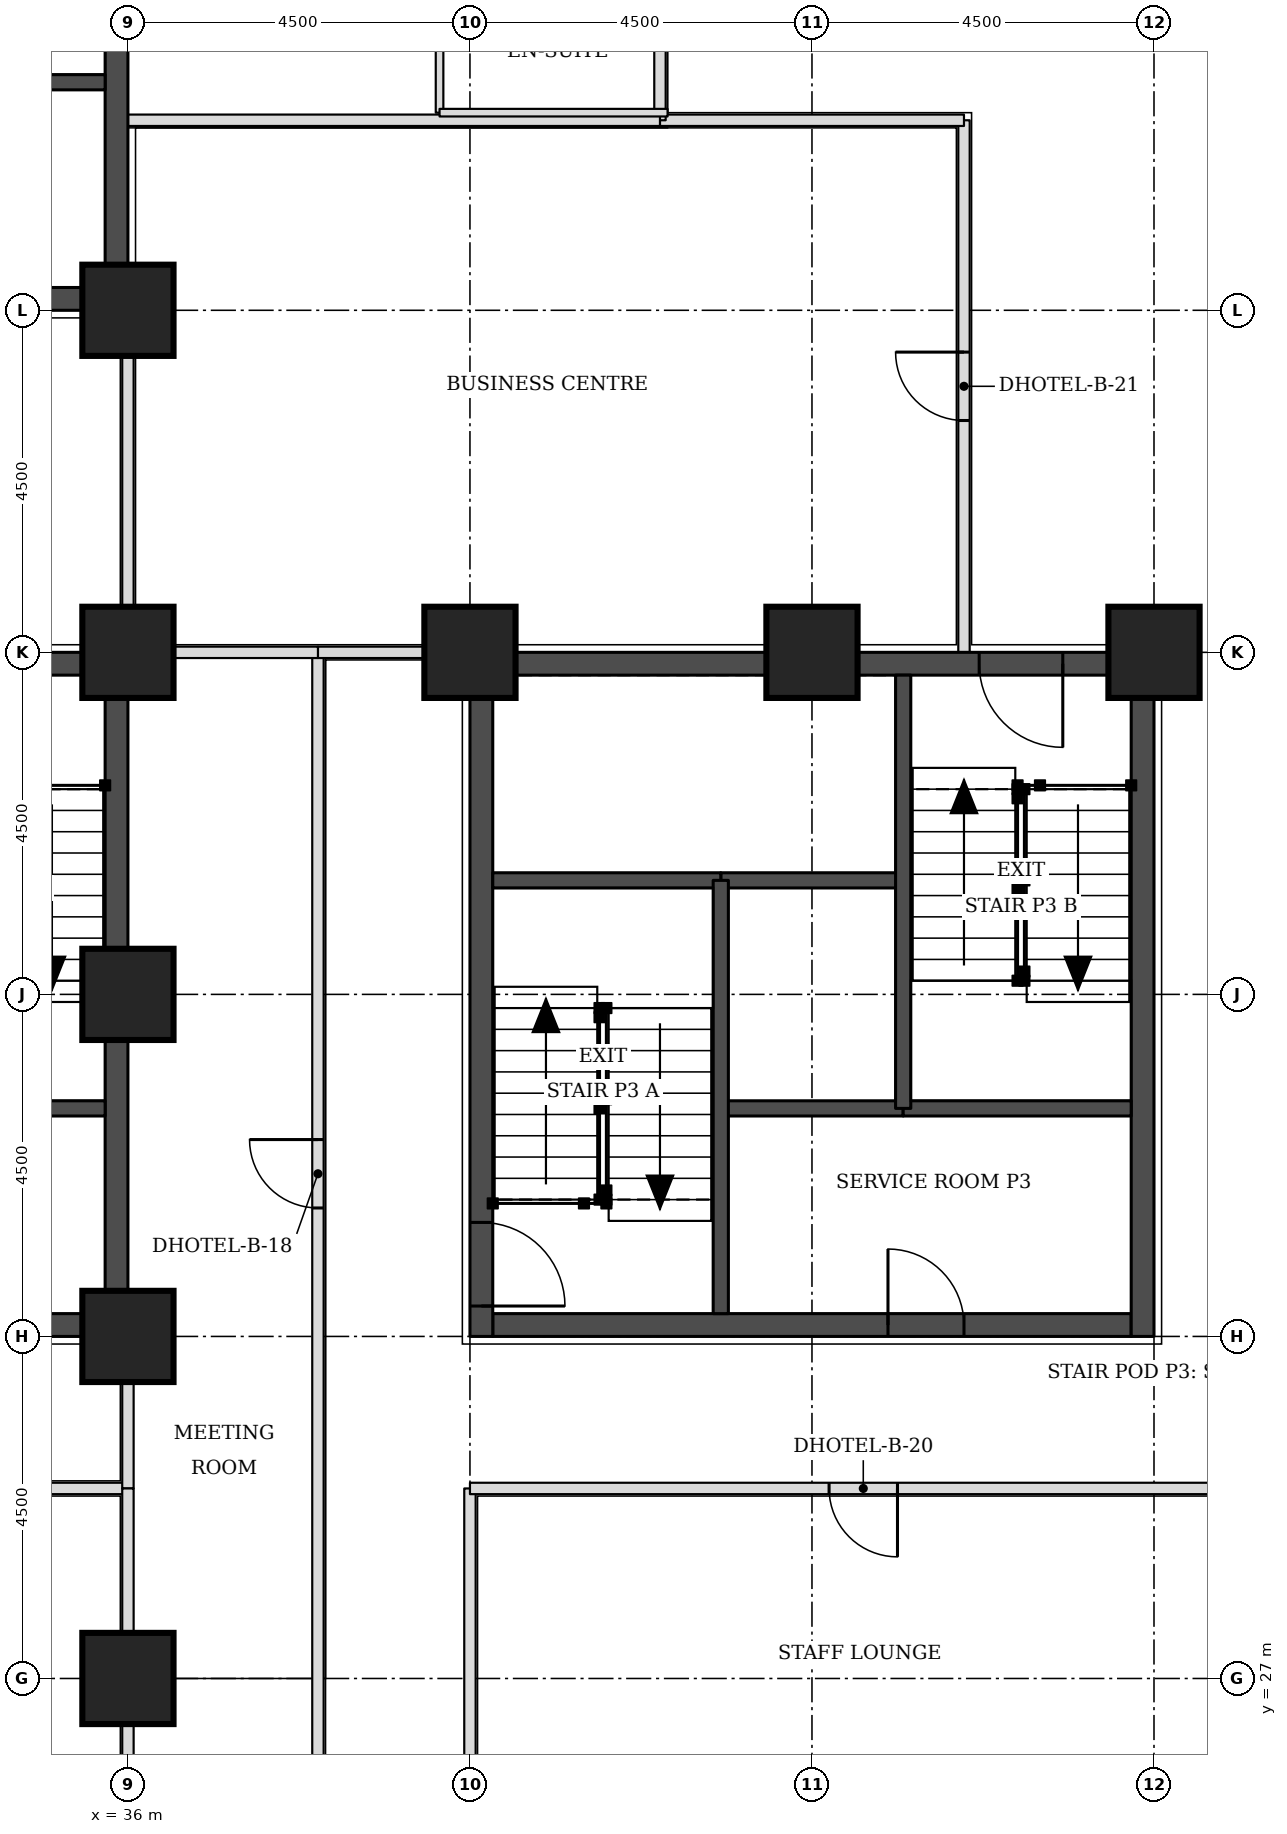
"""IFC4 building model, lengths in metres.
Left out: names, types, materials, properties, quantities, classifications, styles, units other than length and angle.
Written with IfcOpenShell. Run it as: python <this file> out.ifc"""

import sys

from ifc_helpers import new_model, si_unit, direction, frame, frame_2d, origin, origin_2d, place, context, subcontext, project, spatial, rectangle, extrude, element, fill, save


model = new_model("IFC4")
c1 = context("Model", 3, precision=1e-05, world=origin(), true_north=direction((0.0, 1.0)))
c2 = subcontext(c1, "Body", "Model", "MODEL_VIEW")
j1 = project(units=[si_unit("LENGTHUNIT", "METRE"), si_unit("PLANEANGLEUNIT", "RADIAN")], contexts=[c1])
p1 = place(None, origin())
s1 = spatial("IfcSite", under=j1, at=p1, CompositionType="ELEMENT")
p2 = place(p1, origin())
s2 = spatial("IfcBuilding", under=s1, at=p2, CompositionType="ELEMENT")
p3 = place(p2, frame((0.0, 0.0, 29.7)))
s3 = spatial("IfcBuildingStorey", under=s2, at=p3, CompositionType="ELEMENT", Elevation=29.7)
for number, where, z_axis, x_axis in (
    (1, (36.0, 27.0, 0.0), (0.0, 0.0, 1.0), (1.0, 0.0, 0.0)),
    (2, (36.0, 31.5, 0.0), (0.0, 0.0, 1.0), (1.0, 0.0, 0.0)),
    (3, (36.0, 36.0, 0.0), (0.0, 0.0, 1.0), (1.0, 0.0, 0.0)),
    (4, (36.0, 40.5, 0.0), (0.0, 0.0, 1.0), (1.0, 0.0, 0.0)),
    (5, (40.5, 40.5, 0.0), (0.0, 0.0, 1.0), (1.0, 0.0, 0.0)),
    (6, (45.0, 40.5, 0.0), (0.0, 0.0, 1.0), (1.0, 0.0, 0.0)),
    (7, (49.5, 40.5, 0.0), (0.0, 0.0, 1.0), (1.0, 0.0, 0.0)),
    (8, (36.0, 45.0, 0.0), (0.0, 0.0, 1.0), (1.0, 0.0, 0.0)),
):
    element("IfcColumn", number, at=place(p3, frame(where, z_axis=z_axis, x_axis=x_axis)), inside=s3, PredefinedType="COLUMN", context=c2, shape_type="SweptSolid", body=[
        extrude(rectangle(XDim=1.2, YDim=1.2, at=origin_2d()), origin(), (0.0, 0.0, 1.0), 3.3),
    ])
p4 = place(p3, frame((27.3, 45.15, 0.0), z_axis=(0.0, 0.0, 1.0), x_axis=(1.0, 0.0, 0.0)))
e9 = element("IfcWall", 9, at=p4, inside=s3, PredefinedType="SHEAR", context=c2, shape_type="SweptSolid", body=[
    extrude(rectangle(XDim=8.4, YDim=0.3, at=frame_2d((4.2, 0.0))), origin(), (0.0, 0.0, 1.0), 3.3),
])
p5 = place(p4, frame((5.2, 0.0, 0.0)))
e10 = element("IfcOpeningElement", 10, at=p5, cuts=e9, PredefinedType="OPENING", context=c2, shape_type="SweptSolid", body=[
    extrude(rectangle(XDim=1.0, YDim=2.1, at=frame_2d((0.5, 1.05))), frame((0.0, 0.16, 0.0), z_axis=(0.0, -1.0, 0.0), x_axis=(1.0, 0.0, 0.0)), (0.0, 0.0, 1.0), 0.32),
])
p6 = place(p3, frame((35.85, 45.0, 0.0), z_axis=(0.0, 0.0, 1.0), x_axis=(0.0, 1.0, 0.0)))
e11 = element("IfcWall", 11, at=p6, inside=s3, PredefinedType="SHEAR", context=c2, shape_type="SweptSolid", body=[
    extrude(rectangle(XDim=9.0, YDim=0.3, at=frame_2d((4.5, 0.0))), origin(), (0.0, 0.0, 1.0), 3.3),
])
p7 = place(p3, frame((40.8, 31.65, 0.0), z_axis=(0.0, 0.0, 1.0), x_axis=(1.0, 0.0, 0.0)))
e12 = element("IfcWall", 12, at=p7, inside=s3, PredefinedType="SHEAR", context=c2, shape_type="SweptSolid", body=[
    extrude(rectangle(XDim=8.4, YDim=0.3, at=frame_2d((4.2, 0.0))), origin(), (0.0, 0.0, 1.0), 3.3),
])
p8 = place(p7, frame((5.2, 0.0, 0.0)))
e13 = element("IfcOpeningElement", 13, at=p8, cuts=e12, PredefinedType="OPENING", context=c2, shape_type="SweptSolid", body=[
    extrude(rectangle(XDim=1.0, YDim=2.1, at=frame_2d((0.5, 1.05))), frame((0.0, 0.16, 0.0), z_axis=(0.0, -1.0, 0.0), x_axis=(1.0, 0.0, 0.0)), (0.0, 0.0, 1.0), 0.32),
])
p9 = place(p3, frame((40.8, 40.35, 0.0), z_axis=(0.0, 0.0, 1.0), x_axis=(1.0, 0.0, 0.0)))
e14 = element("IfcWall", 14, at=p9, inside=s3, PredefinedType="SHEAR", context=c2, shape_type="SweptSolid", body=[
    extrude(rectangle(XDim=8.4, YDim=0.3, at=frame_2d((4.2, 0.0))), origin(), (0.0, 0.0, 1.0), 3.3),
])
p10 = place(p9, frame((6.4, 0.0, 0.0)))
e15 = element("IfcOpeningElement", 15, at=p10, cuts=e14, PredefinedType="OPENING", context=c2, shape_type="SweptSolid", body=[
    extrude(rectangle(XDim=1.1, YDim=2.1, at=frame_2d((0.55, 1.05))), frame((0.0, 0.16, 0.0), z_axis=(0.0, -1.0, 0.0), x_axis=(1.0, 0.0, 0.0)), (0.0, 0.0, 1.0), 0.32),
])
p11 = place(p3, frame((40.65, 31.5, 0.0), z_axis=(0.0, 0.0, 1.0), x_axis=(0.0, 1.0, 0.0)))
e16 = element("IfcWall", 16, at=p11, inside=s3, PredefinedType="SHEAR", context=c2, shape_type="SweptSolid", body=[
    extrude(rectangle(XDim=9.0, YDim=0.3, at=frame_2d((4.5, 0.0))), origin(), (0.0, 0.0, 1.0), 3.3),
])
p12 = place(p11, frame((0.4, 0.0, 0.0)))
e17 = element("IfcOpeningElement", 17, at=p12, cuts=e16, PredefinedType="OPENING", context=c2, shape_type="SweptSolid", body=[
    extrude(rectangle(XDim=1.1, YDim=2.1, at=frame_2d((0.55, 1.05))), frame((0.0, 0.16, 0.0), z_axis=(0.0, -1.0, 0.0), x_axis=(1.0, 0.0, 0.0)), (0.0, 0.0, 1.0), 0.32),
])
p13 = place(p3, frame((49.35, 31.5, 0.0), z_axis=(0.0, 0.0, 1.0), x_axis=(0.0, 1.0, 0.0)))
e18 = element("IfcWall", 18, at=p13, inside=s3, PredefinedType="SHEAR", context=c2, shape_type="SweptSolid", body=[
    extrude(rectangle(XDim=9.0, YDim=0.3, at=frame_2d((4.5, 0.0))), origin(), (0.0, 0.0, 1.0), 3.3),
])
p14 = place(p3, frame((27.3, 31.65, 0.0), z_axis=(0.0, 0.0, 1.0), x_axis=(1.0, 0.0, 0.0)))
e19 = element("IfcWall", 19, at=p14, inside=s3, PredefinedType="SHEAR", context=c2, shape_type="SweptSolid", body=[
    extrude(rectangle(XDim=8.4, YDim=0.3, at=frame_2d((4.2, 0.0))), origin(), (0.0, 0.0, 1.0), 3.3),
])
p15 = place(p14, frame((4.8, 0.0, 0.0)))
e20 = element("IfcOpeningElement", 20, at=p15, cuts=e19, PredefinedType="OPENING", context=c2, shape_type="SweptSolid", body=[
    extrude(rectangle(XDim=1.8, YDim=2.1, at=frame_2d((0.9, 1.05))), frame((0.0, 0.16, 0.0), z_axis=(0.0, -1.0, 0.0), x_axis=(1.0, 0.0, 0.0)), (0.0, 0.0, 1.0), 0.32),
])
p16 = place(p3, frame((27.3, 40.35, 0.0), z_axis=(0.0, 0.0, 1.0), x_axis=(1.0, 0.0, 0.0)))
e21 = element("IfcWall", 21, at=p16, inside=s3, PredefinedType="SHEAR", context=c2, shape_type="SweptSolid", body=[
    extrude(rectangle(XDim=8.4, YDim=0.3, at=frame_2d((4.2, 0.0))), origin(), (0.0, 0.0, 1.0), 3.3),
])
p17 = place(p16, frame((6.4, 0.0, 0.0)))
e22 = element("IfcOpeningElement", 22, at=p17, cuts=e21, PredefinedType="OPENING", context=c2, shape_type="SweptSolid", body=[
    extrude(rectangle(XDim=1.1, YDim=2.1, at=frame_2d((0.55, 1.05))), frame((0.0, 0.16, 0.0), z_axis=(0.0, -1.0, 0.0), x_axis=(1.0, 0.0, 0.0)), (0.0, 0.0, 1.0), 0.32),
])
p18 = place(p3, frame((35.85, 31.5, 0.0), z_axis=(0.0, 0.0, 1.0), x_axis=(0.0, 1.0, 0.0)))
e23 = element("IfcWall", 23, at=p18, inside=s3, PredefinedType="SHEAR", context=c2, shape_type="SweptSolid", body=[
    extrude(rectangle(XDim=9.0, YDim=0.3, at=frame_2d((4.5, 0.0))), origin(), (0.0, 0.0, 1.0), 3.3),
])
p19 = place(p3, frame((38.5, 25.65, 0.0), z_axis=(0.0, 0.0, 1.0), x_axis=(0.0, 1.0, 0.0)))
e24 = element("IfcWall", 24, at=p19, inside=s3, PredefinedType="PARTITIONING", context=c2, shape_type="SweptSolid", body=[
    extrude(rectangle(XDim=14.85, YDim=0.15, at=frame_2d((7.425, 0.0))), origin(), (0.0, 0.0, 1.0), 3.08),
])
p20 = place(p19, frame((7.54, 0.0, 0.0)))
e25 = element("IfcOpeningElement", 25, at=p20, cuts=e24, PredefinedType="OPENING", context=c2, shape_type="SweptSolid", body=[
    extrude(rectangle(XDim=0.9, YDim=2.1, at=frame_2d((0.45, 1.05))), frame((0.0, 0.085, 0.0), z_axis=(0.0, -1.0, 0.0), x_axis=(1.0, 0.0, 0.0)), (0.0, 0.0, 1.0), 0.17),
])
p21 = place(p3, frame((40.5, 25.65, 0.0), z_axis=(0.0, 0.0, 1.0), x_axis=(0.0, 1.0, 0.0)))
e26 = element("IfcWall", 26, at=p21, inside=s3, PredefinedType="PARTITIONING", context=c2, shape_type="SweptSolid", body=[
    extrude(rectangle(XDim=3.85, YDim=0.15, at=frame_2d((1.925, 0.0))), origin(), (0.0, 0.0, 1.0), 3.08),
])
p22 = place(p3, frame((27.0, 29.5, 0.0), z_axis=(0.0, 0.0, 1.0), x_axis=(1.0, 0.0, 0.0)))
e27 = element("IfcWall", 27, at=p22, inside=s3, PredefinedType="PARTITIONING", context=c2, shape_type="SweptSolid", body=[
    extrude(rectangle(XDim=9.0, YDim=0.15, at=frame_2d((4.5, 0.0))), origin(), (0.0, 0.0, 1.0), 3.08),
])
p23 = place(p22, frame((4.05, 0.0, 0.0)))
e28 = element("IfcOpeningElement", 28, at=p23, cuts=e27, PredefinedType="OPENING", context=c2, shape_type="SweptSolid", body=[
    extrude(rectangle(XDim=0.9, YDim=2.1, at=frame_2d((0.45, 1.05))), frame((0.0, 0.085, 0.0), z_axis=(0.0, -1.0, 0.0), x_axis=(1.0, 0.0, 0.0)), (0.0, 0.0, 1.0), 0.17),
])
p24 = place(p3, frame((36.0, 29.5, 0.0), z_axis=(0.0, 0.0, 1.0), x_axis=(0.0, 1.0, 0.0)))
e29 = element("IfcWall", 29, at=p24, inside=s3, PredefinedType="PARTITIONING", context=c2, shape_type="SweptSolid", body=[
    extrude(rectangle(XDim=1.95, YDim=0.15, at=frame_2d((0.975, 0.0))), origin(), (0.0, 0.0, 1.0), 2.33),
])
p25 = place(p3, frame((40.5, 29.5, 0.0), z_axis=(0.0, 0.0, 1.0), x_axis=(1.0, 0.0, 0.0)))
e30 = element("IfcWall", 30, at=p25, inside=s3, PredefinedType="PARTITIONING", context=c2, shape_type="SweptSolid", body=[
    extrude(rectangle(XDim=10.35, YDim=0.15, at=frame_2d((5.175, 0.0))), origin(), (0.0, 0.0, 1.0), 3.08),
])
p26 = place(p25, frame((4.725, 0.0, 0.0)))
e31 = element("IfcOpeningElement", 31, at=p26, cuts=e30, PredefinedType="OPENING", context=c2, shape_type="SweptSolid", body=[
    extrude(rectangle(XDim=0.9, YDim=2.1, at=frame_2d((0.45, 1.05))), frame((0.0, 0.085, 0.0), z_axis=(0.0, -1.0, 0.0), x_axis=(1.0, 0.0, 0.0)), (0.0, 0.0, 1.0), 0.17),
])
p27 = place(p3, frame((38.5, 40.5, 0.0), z_axis=(0.0, 0.0, 1.0), x_axis=(1.0, 0.0, 0.0)))
e32 = element("IfcWall", 32, at=p27, inside=s3, PredefinedType="PARTITIONING", context=c2, shape_type="SweptSolid", body=[
    extrude(rectangle(XDim=1.95, YDim=0.15, at=frame_2d((0.975, 0.0))), origin(), (0.0, 0.0, 1.0), 2.33),
])
p28 = place(p3, frame((36.0, 40.55, 0.0), z_axis=(0.0, 0.0, 1.0), x_axis=(0.0, 1.0, 0.0)))
e33 = element("IfcWall", 33, at=p28, inside=s3, PredefinedType="PARTITIONING", context=c2, shape_type="SweptSolid", body=[
    extrude(rectangle(XDim=4.4, YDim=0.15, at=frame_2d((2.2, 0.0))), origin(), (0.0, 0.0, 1.0), 2.33),
])
p29 = place(p3, frame((47.0, 40.5, 0.0), z_axis=(0.0, 0.0, 1.0), x_axis=(0.0, 1.0, 0.0)))
e34 = element("IfcWall", 34, at=p29, inside=s3, PredefinedType="PARTITIONING", context=c2, shape_type="SweptSolid", body=[
    extrude(rectangle(XDim=7.0, YDim=0.15, at=frame_2d((3.5, 0.0))), origin(), (0.0, 0.0, 1.0), 3.08),
])
p30 = place(p29, frame((3.05, 0.0, 0.0)))
e35 = element("IfcOpeningElement", 35, at=p30, cuts=e34, PredefinedType="OPENING", context=c2, shape_type="SweptSolid", body=[
    extrude(rectangle(XDim=0.9, YDim=2.1, at=frame_2d((0.45, 1.05))), frame((0.0, 0.085, 0.0), z_axis=(0.0, -1.0, 0.0), x_axis=(1.0, 0.0, 0.0)), (0.0, 0.0, 1.0), 0.17),
])
p31 = place(p3, frame((43.0, 47.5, 0.0), z_axis=(0.0, 0.0, 1.0), x_axis=(1.0, 0.0, 0.0)))
e36 = element("IfcWall", 36, at=p31, inside=s3, PredefinedType="PARTITIONING", context=c2, shape_type="SweptSolid", body=[
    extrude(rectangle(XDim=4.0, YDim=0.15, at=frame_2d((2.0, 0.0))), origin(), (0.0, 0.0, 1.0), 3.08),
])
p32 = place(p3, frame((43.0, 47.5, 0.0), z_axis=(0.0, 0.0, 1.0), x_axis=(0.0, 1.0, 0.0)))
e37 = element("IfcWall", 37, at=p32, inside=s3, PredefinedType="PARTITIONING", context=c2, shape_type="SweptSolid", body=[
    extrude(rectangle(XDim=6.5, YDim=0.15, at=frame_2d((3.25, 0.0))), origin(), (0.0, 0.0, 1.0), 3.08),
])
p33 = place(p32, frame((4.05, 0.0, 0.0)))
e38 = element("IfcOpeningElement", 38, at=p33, cuts=e37, PredefinedType="OPENING", context=c2, shape_type="SweptSolid", body=[
    extrude(rectangle(XDim=1.0, YDim=2.1, at=frame_2d((0.5, 1.05))), frame((0.0, 0.085, 0.0), z_axis=(0.0, -1.0, 0.0), x_axis=(1.0, 0.0, 0.0)), (0.0, 0.0, 1.0), 0.17),
])
p34 = place(p3, frame((36.0, 25.65, 0.0), z_axis=(0.0, 0.0, 1.0), x_axis=(0.0, 1.0, 0.0)))
e39 = element("IfcWall", 39, at=p34, inside=s3, PredefinedType="PARTITIONING", context=c2, shape_type="SweptSolid", body=[
    extrude(rectangle(XDim=3.85, YDim=0.15, at=frame_2d((1.925, 0.0))), origin(), (0.0, 0.0, 1.0), 2.33),
])
p35 = place(p3, frame((36.05, 40.5, 0.0), z_axis=(0.0, 0.0, 1.0), x_axis=(1.0, 0.0, 0.0)))
e40 = element("IfcWall", 40, at=p35, inside=s3, PredefinedType="PARTITIONING", context=c2, shape_type="SweptSolid", body=[
    extrude(rectangle(XDim=2.45, YDim=0.15, at=frame_2d((1.225, 0.0))), origin(), (0.0, 0.0, 1.0), 2.33),
])
p36 = place(p3, frame((36.0, 47.5, 0.0), z_axis=(0.0, 0.0, 1.0), x_axis=(1.0, 0.0, 0.0)))
e41 = element("IfcWall", 41, at=p36, inside=s3, PredefinedType="PARTITIONING", context=c2, shape_type="SweptSolid", body=[
    extrude(rectangle(XDim=7.0, YDim=0.15, at=frame_2d((3.5, 0.0))), origin(), (0.0, 0.0, 1.0), 3.08),
])
p37 = place(p3, frame((40.1, 50.0, 0.0), z_axis=(0.0, 0.0, 1.0), x_axis=(0.0, -1.0, 0.0)))
e42 = element("IfcWall", 42, at=p37, inside=s3, PredefinedType="PARTITIONING", context=c2, shape_type="SweptSolid", body=[
    extrude(rectangle(XDim=2.4, YDim=0.1, at=frame_2d((1.2, 0.0))), origin(), (0.0, 0.0, 1.0), 3.08),
])
p38 = place(p3, frame((40.1, 47.6, 0.0), z_axis=(0.0, 0.0, 1.0), x_axis=(1.0, 0.0, 0.0)))
e43 = element("IfcWall", 43, at=p38, inside=s3, PredefinedType="PARTITIONING", context=c2, shape_type="SweptSolid", body=[
    extrude(rectangle(XDim=3.0, YDim=0.1, at=frame_2d((1.5, 0.0))), origin(), (0.0, 0.0, 1.0), 3.08),
])
p39 = place(p3, frame((32.7, 48.0, 0.0), z_axis=(0.0, 0.0, 1.0), x_axis=(1.0, 0.0, 0.0)))
e44 = element("IfcWall", 44, at=p39, inside=s3, PredefinedType="SOLIDWALL", context=c2, shape_type="SweptSolid", body=[
    extrude(rectangle(XDim=3.0, YDim=0.2, at=frame_2d((1.5, 0.0))), origin(), (0.0, 0.0, 1.0), 3.08),
])
p40 = place(p3, frame((43.8, 34.5, 0.0), z_axis=(0.0, 0.0, 1.0), x_axis=(1.0, 0.0, 0.0)))
e45 = element("IfcWall", 45, at=p40, inside=s3, PredefinedType="SOLIDWALL", context=c2, shape_type="SweptSolid", body=[
    extrude(rectangle(XDim=2.4, YDim=0.2, at=frame_2d((1.2, 0.0))), origin(), (0.0, 0.0, 1.0), 3.08),
])
p41 = place(p3, frame((46.2, 34.5, 0.0), z_axis=(0.0, 0.0, 1.0), x_axis=(1.0, 0.0, 0.0)))
e46 = element("IfcWall", 46, at=p41, inside=s3, PredefinedType="SOLIDWALL", context=c2, shape_type="SweptSolid", body=[
    extrude(rectangle(XDim=3.0, YDim=0.2, at=frame_2d((1.5, 0.0))), origin(), (0.0, 0.0, 1.0), 3.08),
])
p42 = place(p3, frame((43.8, 37.5, 0.0), z_axis=(0.0, 0.0, 1.0), x_axis=(1.0, 0.0, 0.0)))
e47 = element("IfcWall", 47, at=p42, inside=s3, PredefinedType="SOLIDWALL", context=c2, shape_type="SweptSolid", body=[
    extrude(rectangle(XDim=2.4, YDim=0.2, at=frame_2d((1.2, 0.0))), origin(), (0.0, 0.0, 1.0), 3.3),
])
p43 = place(p3, frame((40.8, 37.5, 0.0), z_axis=(0.0, 0.0, 1.0), x_axis=(1.0, 0.0, 0.0)))
e48 = element("IfcWall", 48, at=p43, inside=s3, PredefinedType="SOLIDWALL", context=c2, shape_type="SweptSolid", body=[
    extrude(rectangle(XDim=3.0, YDim=0.2, at=frame_2d((1.5, 0.0))), origin(), (0.0, 0.0, 1.0), 3.08),
])
for number, where, z_axis, x_axis in (
    (49, (43.8, 31.8, 0.0), (0.0, 0.0, 1.0), (0.0, 1.0, 0.0)),
    (50, (46.2, 34.5, 0.0), (0.0, 0.0, 1.0), (0.0, 1.0, 0.0)),
):
    element("IfcWall", number, at=place(p3, frame(where, z_axis=z_axis, x_axis=x_axis)), inside=s3, PredefinedType="SOLIDWALL", context=c2, shape_type="SweptSolid", body=[
        extrude(rectangle(XDim=5.7, YDim=0.2, at=frame_2d((2.85, 0.0))), origin(), (0.0, 0.0, 1.0), 3.08),
    ])
p44 = place(p3, frame((30.3, 34.5, 0.0), z_axis=(0.0, 0.0, 1.0), x_axis=(1.0, 0.0, 0.0)))
e51 = element("IfcWall", 51, at=p44, inside=s3, PredefinedType="SOLIDWALL", context=c2, shape_type="SweptSolid", body=[
    extrude(rectangle(XDim=5.4, YDim=0.2, at=frame_2d((2.7, 0.0))), origin(), (0.0, 0.0, 1.0), 3.08),
])
p45 = place(p44, frame((0.45, 0.0, 0.0)))
e52 = element("IfcOpeningElement", 52, at=p45, cuts=e51, PredefinedType="OPENING", context=c2, shape_type="SweptSolid", body=[
    extrude(rectangle(XDim=1.5, YDim=2.1, at=frame_2d((0.75, 1.05))), frame((0.0, 0.11, 0.0), z_axis=(0.0, -1.0, 0.0), x_axis=(1.0, 0.0, 0.0)), (0.0, 0.0, 1.0), 0.22),
])
p46 = place(p26, frame((0.9, 0.0, 0.0), z_axis=(0.0, 0.0, 1.0), x_axis=(-1.0, 0.0, 0.0)))
e53 = element("IfcDoor", 53, at=p46, inside=s3, OperationType="SINGLE_SWING_LEFT", PredefinedType="DOOR", context=c2, shape_type="SweptSolid", body=[
    extrude(rectangle(XDim=0.9, YDim=2.1, at=frame_2d((0.45, 1.05))), frame((0.0, 0.025, 0.0), z_axis=(0.0, -1.0, 0.0), x_axis=(1.0, 0.0, 0.0)), (0.0, 0.0, 1.0), 0.05),
])
fill(e31, e53)
p47 = place(p30, origin())
e54 = element("IfcDoor", 54, at=p47, inside=s3, OperationType="SINGLE_SWING_RIGHT", PredefinedType="DOOR", context=c2, shape_type="SweptSolid", body=[
    extrude(rectangle(XDim=0.9, YDim=2.1, at=frame_2d((0.45, 1.05))), frame((0.0, 0.025, 0.0), z_axis=(0.0, -1.0, 0.0), x_axis=(1.0, 0.0, 0.0)), (0.0, 0.0, 1.0), 0.05),
])
fill(e35, e54)
p48 = place(p20, origin())
e55 = element("IfcDoor", 55, at=p48, inside=s3, OperationType="SINGLE_SWING_RIGHT", PredefinedType="DOOR", context=c2, shape_type="SweptSolid", body=[
    extrude(rectangle(XDim=0.9, YDim=2.1, at=frame_2d((0.45, 1.05))), frame((0.0, 0.025, 0.0), z_axis=(0.0, -1.0, 0.0), x_axis=(1.0, 0.0, 0.0)), (0.0, 0.0, 1.0), 0.05),
])
fill(e25, e55)
p49 = place(p12, frame((1.1, 0.0, 0.0), z_axis=(0.0, 0.0, 1.0), x_axis=(-1.0, 0.0, 0.0)))
e56 = element("IfcDoor", 56, at=p49, inside=s3, OperationType="SINGLE_SWING_RIGHT", PredefinedType="DOOR", context=c2, shape_type="SweptSolid", body=[
    extrude(rectangle(XDim=1.1, YDim=2.1, at=frame_2d((0.55, 1.05))), frame((0.0, 0.025, 0.0), z_axis=(0.0, -1.0, 0.0), x_axis=(1.0, 0.0, 0.0)), (0.0, 0.0, 1.0), 0.05),
])
fill(e17, e56)
p50 = place(p10, frame((1.1, 0.0, 0.0), z_axis=(0.0, 0.0, 1.0), x_axis=(-1.0, 0.0, 0.0)))
e57 = element("IfcDoor", 57, at=p50, inside=s3, OperationType="SINGLE_SWING_LEFT", PredefinedType="DOOR", context=c2, shape_type="SweptSolid", body=[
    extrude(rectangle(XDim=1.1, YDim=2.1, at=frame_2d((0.55, 1.05))), frame((0.0, 0.025, 0.0), z_axis=(0.0, -1.0, 0.0), x_axis=(1.0, 0.0, 0.0)), (0.0, 0.0, 1.0), 0.05),
])
fill(e15, e57)
p51 = place(p8, origin())
e58 = element("IfcDoor", 58, at=p51, inside=s3, OperationType="SINGLE_SWING_LEFT", PredefinedType="DOOR", context=c2, shape_type="SweptSolid", body=[
    extrude(rectangle(XDim=1.0, YDim=2.1, at=frame_2d((0.5, 1.05))), frame((0.0, 0.025, 0.0), z_axis=(0.0, -1.0, 0.0), x_axis=(1.0, 0.0, 0.0)), (0.0, 0.0, 1.0), 0.05),
])
fill(e13, e58)
save(model, sys.argv[1])
